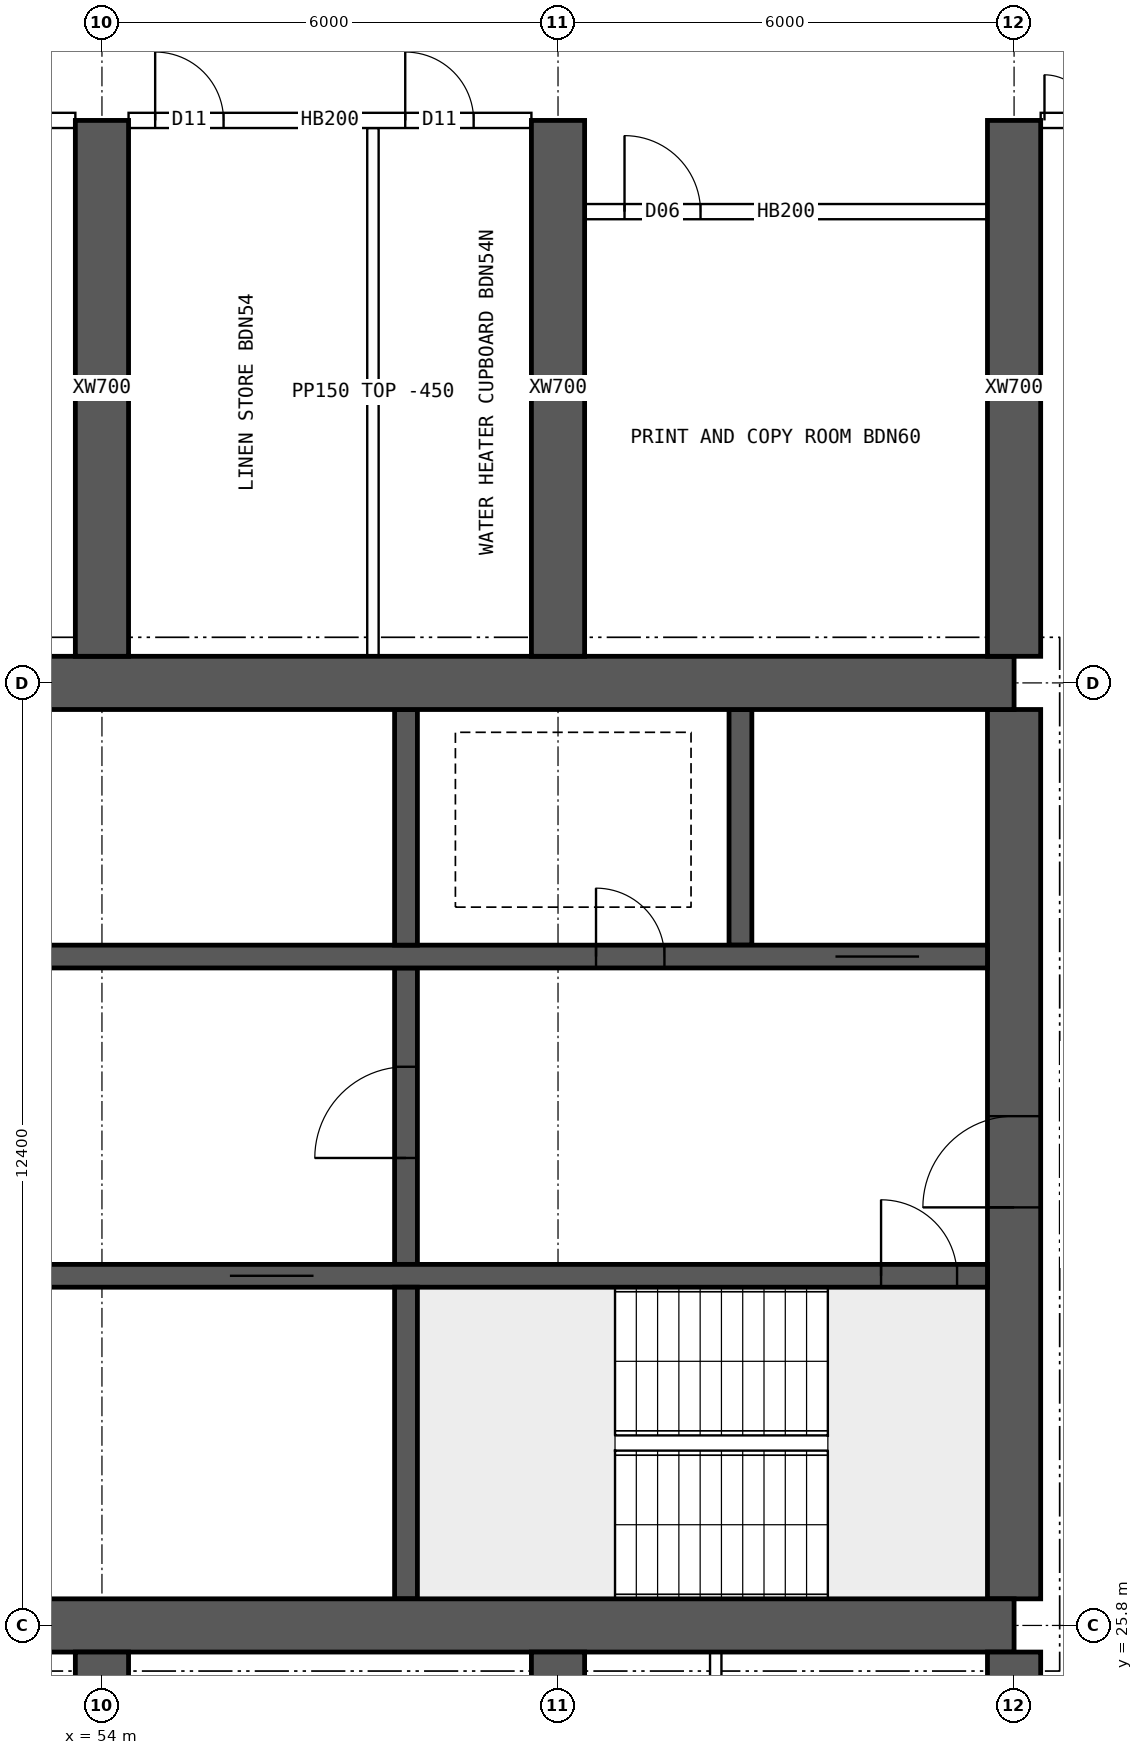
"""IFC4 building model, lengths in metres.
Left out: names, types, materials, properties, quantities, classifications, styles, units other than length and angle.
Written with IfcOpenShell. Run it as: python <this file> out.ifc"""

import sys

from ifc_helpers import new_model, si_unit, direction, frame, frame_2d, origin, place, context, subcontext, project, spatial, rectangle, extrude, element, fill, save


model = new_model("IFC4")
c1 = context("Model", 3, precision=1e-05, world=origin(), true_north=direction((0.0, 1.0)))
c2 = subcontext(c1, "Body", "Model", "MODEL_VIEW")
j1 = project(units=[si_unit("LENGTHUNIT", "METRE"), si_unit("PLANEANGLEUNIT", "RADIAN")], contexts=[c1])
p1 = place(None, origin())
s1 = spatial("IfcSite", under=j1, at=p1, CompositionType="ELEMENT")
p2 = place(p1, origin())
s2 = spatial("IfcBuilding", under=s1, at=p2, CompositionType="ELEMENT")
p3 = place(p2, frame((0.0, 0.0, 227.8)))
s3 = spatial("IfcBuildingStorey", under=s2, at=p3, CompositionType="ELEMENT", Elevation=227.8)
for number, where, z_axis, x_axis in (
    (1, (18.0, 25.8, 0.0), (0.0, 0.0, 1.0), (1.0, 0.0, 0.0)),
    (2, (18.0, 38.2, 0.0), (0.0, 0.0, 1.0), (1.0, 0.0, 0.0)),
):
    element("IfcWall", number, at=place(p3, frame(where, z_axis=z_axis, x_axis=x_axis)), inside=s3, PredefinedType="SHEAR", context=c2, shape_type="SweptSolid", body=[
        extrude(rectangle(XDim=48.0, YDim=0.7, at=frame_2d((24.0, 0.0))), origin(), (0.0, 0.0, 1.0), 3.75),
    ])
p4 = place(p3, frame((66.0, 26.15, 0.0), z_axis=(0.0, 0.0, 1.0), x_axis=(0.0, 1.0, 0.0)))
e3 = element("IfcWall", 3, at=p4, inside=s3, PredefinedType="SHEAR", context=c2, shape_type="SweptSolid", body=[
    extrude(rectangle(XDim=11.7, YDim=0.7, at=frame_2d((5.85, 0.0))), origin(), (0.0, 0.0, 1.0), 3.75),
])
p5 = place(p4, frame((5.15, 0.0, 0.0)))
e4 = element("IfcOpeningElement", 4, at=p5, cuts=e3, PredefinedType="OPENING", context=c2, shape_type="SweptSolid", body=[
    extrude(rectangle(XDim=1.2, YDim=2.1, at=frame_2d((0.6, 1.05))), frame((0.0, 0.36, 0.0), z_axis=(0.0, -1.0, 0.0), x_axis=(1.0, 0.0, 0.0)), (0.0, 0.0, 1.0), 0.72),
])
p6 = place(p3, frame((18.35, 30.4, 0.0), z_axis=(0.0, 0.0, 1.0), x_axis=(1.0, 0.0, 0.0)))
e5 = element("IfcWall", 5, at=p6, inside=s3, PredefinedType="SHEAR", context=c2, shape_type="SweptSolid", body=[
    extrude(rectangle(XDim=47.3, YDim=0.3, at=frame_2d((23.65, 0.0))), origin(), (0.0, 0.0, 1.0), 3.75),
])
p7 = place(p6, frame((0.4, 0.0, 0.0)))
e6 = element("IfcOpeningElement", 6, at=p7, cuts=e5, PredefinedType="OPENING", context=c2, shape_type="SweptSolid", body=[
    extrude(rectangle(XDim=1.0, YDim=2.1, at=frame_2d((0.5, 1.05))), frame((0.0, 0.16, 0.0), z_axis=(0.0, -1.0, 0.0), x_axis=(1.0, 0.0, 0.0)), (0.0, 0.0, 1.0), 0.32),
])
p8 = place(p6, frame((45.9, 0.0, 0.0)))
e7 = element("IfcOpeningElement", 7, at=p8, cuts=e5, PredefinedType="OPENING", context=c2, shape_type="SweptSolid", body=[
    extrude(rectangle(XDim=1.0, YDim=2.1, at=frame_2d((0.5, 1.05))), frame((0.0, 0.16, 0.0), z_axis=(0.0, -1.0, 0.0), x_axis=(1.0, 0.0, 0.0)), (0.0, 0.0, 1.0), 0.32),
])
p9 = place(p6, frame((8.4, 0.0, 0.0)))
e8 = element("IfcOpeningElement", 8, at=p9, cuts=e5, PredefinedType="OPENING", context=c2, shape_type="SweptSolid", body=[
    extrude(rectangle(XDim=1.1, YDim=2.1, at=frame_2d((0.55, 1.05))), frame((0.0, 0.16, 0.0), z_axis=(0.0, -1.0, 0.0), x_axis=(1.0, 0.0, 0.0)), (0.0, 0.0, 1.0), 0.32),
])
p10 = place(p6, frame((11.0, 0.0, 0.0)))
e9 = element("IfcOpeningElement", 9, at=p10, cuts=e5, PredefinedType="OPENING", context=c2, shape_type="SweptSolid", body=[
    extrude(rectangle(XDim=1.1, YDim=2.1, at=frame_2d((0.55, 1.05))), frame((0.0, 0.16, 0.0), z_axis=(0.0, -1.0, 0.0), x_axis=(1.0, 0.0, 0.0)), (0.0, 0.0, 1.0), 0.32),
])
p11 = place(p6, frame((13.6, 0.0, 0.0)))
e10 = element("IfcOpeningElement", 10, at=p11, cuts=e5, PredefinedType="OPENING", context=c2, shape_type="SweptSolid", body=[
    extrude(rectangle(XDim=1.1, YDim=2.1, at=frame_2d((0.55, 1.05))), frame((0.0, 0.16, 0.0), z_axis=(0.0, -1.0, 0.0), x_axis=(1.0, 0.0, 0.0)), (0.0, 0.0, 1.0), 0.32),
])
p12 = place(p6, frame((16.2, 0.0, 0.0)))
e11 = element("IfcOpeningElement", 11, at=p12, cuts=e5, PredefinedType="OPENING", context=c2, shape_type="SweptSolid", body=[
    extrude(rectangle(XDim=1.1, YDim=2.1, at=frame_2d((0.55, 1.05))), frame((0.0, 0.16, 0.0), z_axis=(0.0, -1.0, 0.0), x_axis=(1.0, 0.0, 0.0)), (0.0, 0.0, 1.0), 0.32),
])
p13 = place(p6, frame((18.975, 0.0, 0.0)))
e12 = element("IfcOpeningElement", 12, at=p13, cuts=e5, PredefinedType="OPENING", context=c2, shape_type="SweptSolid", body=[
    extrude(rectangle(XDim=0.9, YDim=2.1, at=frame_2d((0.45, 1.05))), frame((0.0, 0.16, 0.0), z_axis=(0.0, -1.0, 0.0), x_axis=(1.0, 0.0, 0.0)), (0.0, 0.0, 1.0), 0.32),
])
p14 = place(p6, frame((24.475, 0.0, 0.0)))
e13 = element("IfcOpeningElement", 13, at=p14, cuts=e5, PredefinedType="OPENING", context=c2, shape_type="SweptSolid", body=[
    extrude(rectangle(XDim=0.9, YDim=2.1, at=frame_2d((0.45, 1.05))), frame((0.0, 0.16, 0.0), z_axis=(0.0, -1.0, 0.0), x_axis=(1.0, 0.0, 0.0)), (0.0, 0.0, 1.0), 0.32),
])
p15 = place(p6, frame((30.267, 0.0, 0.0)))
e14 = element("IfcOpeningElement", 14, at=p15, cuts=e5, PredefinedType="OPENING", context=c2, shape_type="SweptSolid", body=[
    extrude(rectangle(XDim=1.1, YDim=2.1, at=frame_2d((0.55, 1.05))), frame((0.0, 0.16, 0.0), z_axis=(0.0, -1.0, 0.0), x_axis=(1.0, 0.0, 0.0)), (0.0, 0.0, 1.0), 0.32),
])
p16 = place(p6, frame((33.8, 0.0, 0.0)))
e15 = element("IfcOpeningElement", 15, at=p16, cuts=e5, PredefinedType="OPENING", context=c2, shape_type="SweptSolid", body=[
    extrude(rectangle(XDim=1.1, YDim=2.1, at=frame_2d((0.55, 1.05))), frame((0.0, 0.16, 0.0), z_axis=(0.0, -1.0, 0.0), x_axis=(1.0, 0.0, 0.0)), (0.0, 0.0, 1.0), 0.32),
])
p17 = place(p6, frame((37.333, 0.0, 0.0)))
e16 = element("IfcOpeningElement", 16, at=p17, cuts=e5, PredefinedType="OPENING", context=c2, shape_type="SweptSolid", body=[
    extrude(rectangle(XDim=1.1, YDim=2.1, at=frame_2d((0.55, 1.05))), frame((0.0, 0.16, 0.0), z_axis=(0.0, -1.0, 0.0), x_axis=(1.0, 0.0, 0.0)), (0.0, 0.0, 1.0), 0.32),
])
p18 = place(p3, frame((18.35, 34.6, 0.0), z_axis=(0.0, 0.0, 1.0), x_axis=(1.0, 0.0, 0.0)))
e17 = element("IfcWall", 17, at=p18, inside=s3, PredefinedType="SHEAR", context=c2, shape_type="SweptSolid", body=[
    extrude(rectangle(XDim=47.3, YDim=0.3, at=frame_2d((23.65, 0.0))), origin(), (0.0, 0.0, 1.0), 3.75),
])
p19 = place(p18, frame((0.9, 0.0, 0.0)))
e18 = element("IfcOpeningElement", 18, at=p19, cuts=e17, PredefinedType="OPENING", context=c2, shape_type="SweptSolid", body=[
    extrude(rectangle(XDim=1.1, YDim=2.1, at=frame_2d((0.55, 1.05))), frame((0.0, 0.16, 0.0), z_axis=(0.0, -1.0, 0.0), x_axis=(1.0, 0.0, 0.0)), (0.0, 0.0, 1.0), 0.32),
])
p20 = place(p18, frame((45.3, 0.0, 0.0)))
e19 = element("IfcOpeningElement", 19, at=p20, cuts=e17, PredefinedType="OPENING", context=c2, shape_type="SweptSolid", body=[
    extrude(rectangle(XDim=1.1, YDim=2.1, at=frame_2d((0.55, 1.05))), frame((0.0, 0.16, 0.0), z_axis=(0.0, -1.0, 0.0), x_axis=(1.0, 0.0, 0.0)), (0.0, 0.0, 1.0), 0.32),
])
p21 = place(p18, frame((4.25, 0.0, 0.0)))
e20 = element("IfcOpeningElement", 20, at=p21, cuts=e17, PredefinedType="OPENING", context=c2, shape_type="SweptSolid", body=[
    extrude(rectangle(XDim=0.9, YDim=2.1, at=frame_2d((0.45, 1.05))), frame((0.0, 0.16, 0.0), z_axis=(0.0, -1.0, 0.0), x_axis=(1.0, 0.0, 0.0)), (0.0, 0.0, 1.0), 0.32),
])
p22 = place(p18, frame((42.15, 0.0, 0.0)))
e21 = element("IfcOpeningElement", 21, at=p22, cuts=e17, PredefinedType="OPENING", context=c2, shape_type="SweptSolid", body=[
    extrude(rectangle(XDim=0.9, YDim=2.1, at=frame_2d((0.45, 1.05))), frame((0.0, 0.16, 0.0), z_axis=(0.0, -1.0, 0.0), x_axis=(1.0, 0.0, 0.0)), (0.0, 0.0, 1.0), 0.32),
])
p23 = place(p18, frame((9.025, 0.0, 0.0)))
e22 = element("IfcOpeningElement", 22, at=p23, cuts=e17, PredefinedType="OPENING", context=c2, shape_type="SweptSolid", body=[
    extrude(rectangle(XDim=0.9, YDim=2.1, at=frame_2d((0.45, 1.05))), frame((0.0, 0.16, 0.0), z_axis=(0.0, -1.0, 0.0), x_axis=(1.0, 0.0, 0.0)), (0.0, 0.0, 1.0), 0.32),
])
p24 = place(p18, frame((12.999, 0.0, 0.0)))
e23 = element("IfcOpeningElement", 23, at=p24, cuts=e17, PredefinedType="OPENING", context=c2, shape_type="SweptSolid", body=[
    extrude(rectangle(XDim=0.9, YDim=2.1, at=frame_2d((0.45, 1.05))), frame((0.0, 0.16, 0.0), z_axis=(0.0, -1.0, 0.0), x_axis=(1.0, 0.0, 0.0)), (0.0, 0.0, 1.0), 0.32),
])
p25 = place(p18, frame((16.646, 0.0, 0.0)))
e24 = element("IfcOpeningElement", 24, at=p25, cuts=e17, PredefinedType="OPENING", context=c2, shape_type="SweptSolid", body=[
    extrude(rectangle(XDim=0.9, YDim=2.1, at=frame_2d((0.45, 1.05))), frame((0.0, 0.16, 0.0), z_axis=(0.0, -1.0, 0.0), x_axis=(1.0, 0.0, 0.0)), (0.0, 0.0, 1.0), 0.32),
])
p26 = place(p18, frame((20.405, 0.0, 0.0)))
e25 = element("IfcOpeningElement", 25, at=p26, cuts=e17, PredefinedType="OPENING", context=c2, shape_type="SweptSolid", body=[
    extrude(rectangle(XDim=0.9, YDim=2.1, at=frame_2d((0.45, 1.05))), frame((0.0, 0.16, 0.0), z_axis=(0.0, -1.0, 0.0), x_axis=(1.0, 0.0, 0.0)), (0.0, 0.0, 1.0), 0.32),
])
p27 = place(p18, frame((24.811, 0.0, 0.0)))
e26 = element("IfcOpeningElement", 26, at=p27, cuts=e17, PredefinedType="OPENING", context=c2, shape_type="SweptSolid", body=[
    extrude(rectangle(XDim=0.9, YDim=2.1, at=frame_2d((0.45, 1.05))), frame((0.0, 0.16, 0.0), z_axis=(0.0, -1.0, 0.0), x_axis=(1.0, 0.0, 0.0)), (0.0, 0.0, 1.0), 0.32),
])
p28 = place(p18, frame((27.608, 0.0, 0.0)))
e27 = element("IfcOpeningElement", 27, at=p28, cuts=e17, PredefinedType="OPENING", context=c2, shape_type="SweptSolid", body=[
    extrude(rectangle(XDim=0.9, YDim=2.1, at=frame_2d((0.45, 1.05))), frame((0.0, 0.16, 0.0), z_axis=(0.0, -1.0, 0.0), x_axis=(1.0, 0.0, 0.0)), (0.0, 0.0, 1.0), 0.32),
])
p29 = place(p18, frame((33.729, 0.0, 0.0)))
e28 = element("IfcOpeningElement", 28, at=p29, cuts=e17, PredefinedType="OPENING", context=c2, shape_type="SweptSolid", body=[
    extrude(rectangle(XDim=0.9, YDim=2.1, at=frame_2d((0.45, 1.05))), frame((0.0, 0.16, 0.0), z_axis=(0.0, -1.0, 0.0), x_axis=(1.0, 0.0, 0.0)), (0.0, 0.0, 1.0), 0.32),
])
p30 = place(p3, frame((58.0, 26.15, 0.0), z_axis=(0.0, 0.0, 1.0), x_axis=(0.0, 1.0, 0.0)))
e29 = element("IfcWall", 29, at=p30, inside=s3, PredefinedType="SHEAR", context=c2, shape_type="SweptSolid", body=[
    extrude(rectangle(XDim=4.1, YDim=0.3, at=frame_2d((2.05, 0.0))), origin(), (0.0, 0.0, 1.0), 3.75),
])
p31 = place(p3, frame((58.0, 30.55, 0.0), z_axis=(0.0, 0.0, 1.0), x_axis=(0.0, 1.0, 0.0)))
e30 = element("IfcWall", 30, at=p31, inside=s3, PredefinedType="SHEAR", context=c2, shape_type="SweptSolid", body=[
    extrude(rectangle(XDim=3.9, YDim=0.3, at=frame_2d((1.95, 0.0))), origin(), (0.0, 0.0, 1.0), 3.75),
])
p32 = place(p31, frame((1.4, 0.0, 0.0)))
e31 = element("IfcOpeningElement", 31, at=p32, cuts=e30, PredefinedType="OPENING", context=c2, shape_type="SweptSolid", body=[
    extrude(rectangle(XDim=1.2, YDim=2.1, at=frame_2d((0.6, 1.05))), frame((0.0, 0.16, 0.0), z_axis=(0.0, -1.0, 0.0), x_axis=(1.0, 0.0, 0.0)), (0.0, 0.0, 1.0), 0.32),
])
for number, where, z_axis, x_axis in (
    (32, (62.4, 34.75, 0.0), (0.0, 0.0, 1.0), (0.0, 1.0, 0.0)),
    (33, (58.0, 34.75, 0.0), (0.0, 0.0, 1.0), (0.0, 1.0, 0.0)),
):
    element("IfcWall", number, at=place(p3, frame(where, z_axis=z_axis, x_axis=x_axis)), inside=s3, PredefinedType="SHEAR", context=c2, shape_type="SweptSolid", body=[
        extrude(rectangle(XDim=3.1, YDim=0.3, at=frame_2d((1.55, 0.0))), origin(), (0.0, 0.0, 1.0), 3.75),
    ])
for number, where, z_axis, x_axis in (
    (34, (54.0, 18.4, 0.0), (0.0, 0.0, 1.0), (0.0, 1.0, 0.0)),
    (35, (54.0, 38.55, 0.0), (0.0, 0.0, 1.0), (0.0, 1.0, 0.0)),
    (36, (60.0, 18.4, 0.0), (0.0, 0.0, 1.0), (0.0, 1.0, 0.0)),
    (37, (60.0, 38.55, 0.0), (0.0, 0.0, 1.0), (0.0, 1.0, 0.0)),
    (38, (66.0, 18.4, 0.0), (0.0, 0.0, 1.0), (0.0, 1.0, 0.0)),
    (39, (66.0, 38.55, 0.0), (0.0, 0.0, 1.0), (0.0, 1.0, 0.0)),
):
    element("IfcWall", number, at=place(p3, frame(where, z_axis=z_axis, x_axis=x_axis)), inside=s3, PredefinedType="SHEAR", context=c2, shape_type="SweptSolid", body=[
        extrude(rectangle(XDim=7.05, YDim=0.7, at=frame_2d((3.525, 0.0))), origin(), (0.0, 0.0, 1.0), 3.75),
    ])
p33 = place(p3, frame((48.35, 45.6, 0.0), z_axis=(0.0, 0.0, 1.0), x_axis=(1.0, 0.0, 0.0)))
e40 = element("IfcWall", 40, at=p33, inside=s3, PredefinedType="SOLIDWALL", context=c2, shape_type="SweptSolid", body=[
    extrude(rectangle(XDim=5.3, YDim=0.2, at=frame_2d((2.65, 0.0))), origin(), (0.0, 0.0, 1.0), 3.3),
])
p34 = place(p33, frame((0.525, 0.0, 0.0)))
e41 = element("IfcOpeningElement", 41, at=p34, cuts=e40, PredefinedType="OPENING", context=c2, shape_type="SweptSolid", body=[
    extrude(rectangle(XDim=1.0, YDim=2.1, at=frame_2d((0.5, 1.05))), frame((0.0, 0.11, 0.0), z_axis=(0.0, -1.0, 0.0), x_axis=(1.0, 0.0, 0.0)), (0.0, 0.0, 1.0), 0.22),
])
p35 = place(p3, frame((54.35, 45.6, 0.0), z_axis=(0.0, 0.0, 1.0), x_axis=(1.0, 0.0, 0.0)))
e42 = element("IfcWall", 42, at=p35, inside=s3, PredefinedType="SOLIDWALL", context=c2, shape_type="SweptSolid", body=[
    extrude(rectangle(XDim=5.3, YDim=0.2, at=frame_2d((2.65, 0.0))), origin(), (0.0, 0.0, 1.0), 3.3),
])
p36 = place(p35, frame((0.35, 0.0, 0.0)))
e43 = element("IfcOpeningElement", 43, at=p36, cuts=e42, PredefinedType="OPENING", context=c2, shape_type="SweptSolid", body=[
    extrude(rectangle(XDim=0.9, YDim=2.1, at=frame_2d((0.45, 1.05))), frame((0.0, 0.11, 0.0), z_axis=(0.0, -1.0, 0.0), x_axis=(1.0, 0.0, 0.0)), (0.0, 0.0, 1.0), 0.22),
])
p37 = place(p35, frame((3.64, 0.0, 0.0)))
e44 = element("IfcOpeningElement", 44, at=p37, cuts=e42, PredefinedType="OPENING", context=c2, shape_type="SweptSolid", body=[
    extrude(rectangle(XDim=0.9, YDim=2.1, at=frame_2d((0.45, 1.05))), frame((0.0, 0.11, 0.0), z_axis=(0.0, -1.0, 0.0), x_axis=(1.0, 0.0, 0.0)), (0.0, 0.0, 1.0), 0.22),
])
p38 = place(p3, frame((66.35, 45.6, 0.0), z_axis=(0.0, 0.0, 1.0), x_axis=(1.0, 0.0, 0.0)))
e45 = element("IfcWall", 45, at=p38, inside=s3, PredefinedType="SOLIDWALL", context=c2, shape_type="SweptSolid", body=[
    extrude(rectangle(XDim=2.05, YDim=0.2, at=frame_2d((1.025, 0.0))), origin(), (0.0, 0.0, 1.0), 3.3),
])
p39 = place(p38, frame((0.05, 0.0, 0.0)))
e46 = element("IfcOpeningElement", 46, at=p39, cuts=e45, PredefinedType="OPENING", context=c2, shape_type="SweptSolid", body=[
    extrude(rectangle(XDim=1.2, YDim=2.1, at=frame_2d((0.6, 1.05))), frame((0.0, 0.11, 0.0), z_axis=(0.0, -1.0, 0.0), x_axis=(1.0, 0.0, 0.0)), (0.0, 0.0, 1.0), 0.22),
])
for number, where, z_axis, x_axis in (
    (47, (62.075, 18.5, 0.0), (0.0, 0.0, 1.0), (0.0, 1.0, 0.0)),
    (48, (57.565, 38.55, 0.0), (0.0, 0.0, 1.0), (0.0, 1.0, 0.0)),
):
    element("IfcWall", number, at=place(p3, frame(where, z_axis=z_axis, x_axis=x_axis)), inside=s3, PredefinedType="PARTITIONING", context=c2, shape_type="SweptSolid", body=[
        extrude(rectangle(XDim=6.95, YDim=0.15, at=frame_2d((3.475, 0.0))), origin(), (0.0, 0.0, 1.0), 3.3),
    ])
p40 = place(p3, frame((60.35, 44.4, 0.0), z_axis=(0.0, 0.0, 1.0), x_axis=(1.0, 0.0, 0.0)))
e49 = element("IfcWall", 49, at=p40, inside=s3, PredefinedType="SOLIDWALL", context=c2, shape_type="SweptSolid", body=[
    extrude(rectangle(XDim=5.3, YDim=0.2, at=frame_2d((2.65, 0.0))), origin(), (0.0, 0.0, 1.0), 3.3),
])
p41 = place(p40, frame((0.525, 0.0, 0.0)))
e50 = element("IfcOpeningElement", 50, at=p41, cuts=e49, PredefinedType="OPENING", context=c2, shape_type="SweptSolid", body=[
    extrude(rectangle(XDim=1.0, YDim=2.1, at=frame_2d((0.5, 1.05))), frame((0.0, 0.11, 0.0), z_axis=(0.0, -1.0, 0.0), x_axis=(1.0, 0.0, 0.0)), (0.0, 0.0, 1.0), 0.22),
])
p42 = place(p5, origin())
e51 = element("IfcDoor", 51, at=p42, inside=s3, OperationType="SINGLE_SWING_LEFT", PredefinedType="DOOR", context=c2, shape_type="SweptSolid", body=[
    extrude(rectangle(XDim=1.2, YDim=2.1, at=frame_2d((0.6, 1.05))), frame((0.0, 0.025, 0.0), z_axis=(0.0, -1.0, 0.0), x_axis=(1.0, 0.0, 0.0)), (0.0, 0.0, 1.0), 0.05),
])
fill(e4, e51)
p43 = place(p8, origin())
e52 = element("IfcDoor", 52, at=p43, inside=s3, OperationType="SINGLE_SWING_LEFT", PredefinedType="DOOR", context=c2, shape_type="SweptSolid", body=[
    extrude(rectangle(XDim=1.0, YDim=2.1, at=frame_2d((0.5, 1.05))), frame((0.0, 0.025, 0.0), z_axis=(0.0, -1.0, 0.0), x_axis=(1.0, 0.0, 0.0)), (0.0, 0.0, 1.0), 0.05),
])
fill(e7, e52)
p44 = place(p20, origin())
e53 = element("IfcDoor", 53, at=p44, inside=s3, OperationType="DOUBLE_DOOR_SLIDING", PredefinedType="DOOR", context=c2, shape_type="SweptSolid", body=[
    extrude(rectangle(XDim=1.1, YDim=2.1, at=frame_2d((0.55, 1.05))), frame((0.0, 0.025, 0.0), z_axis=(0.0, -1.0, 0.0), x_axis=(1.0, 0.0, 0.0)), (0.0, 0.0, 1.0), 0.05),
])
fill(e19, e53)
p45 = place(p22, origin())
e54 = element("IfcDoor", 54, at=p45, inside=s3, OperationType="SINGLE_SWING_LEFT", PredefinedType="DOOR", context=c2, shape_type="SweptSolid", body=[
    extrude(rectangle(XDim=0.9, YDim=2.1, at=frame_2d((0.45, 1.05))), frame((0.0, 0.025, 0.0), z_axis=(0.0, -1.0, 0.0), x_axis=(1.0, 0.0, 0.0)), (0.0, 0.0, 1.0), 0.05),
])
fill(e21, e54)
p46 = place(p32, origin())
e55 = element("IfcDoor", 55, at=p46, inside=s3, OperationType="SINGLE_SWING_LEFT", PredefinedType="DOOR", context=c2, shape_type="SweptSolid", body=[
    extrude(rectangle(XDim=1.2, YDim=2.1, at=frame_2d((0.6, 1.05))), frame((0.0, 0.025, 0.0), z_axis=(0.0, -1.0, 0.0), x_axis=(1.0, 0.0, 0.0)), (0.0, 0.0, 1.0), 0.05),
])
fill(e31, e55)
p47 = place(p17, origin())
e56 = element("IfcDoor", 56, at=p47, inside=s3, OperationType="DOUBLE_DOOR_SLIDING", PredefinedType="DOOR", context=c2, shape_type="SweptSolid", body=[
    extrude(rectangle(XDim=1.1, YDim=2.1, at=frame_2d((0.55, 1.05))), frame((0.0, 0.025, 0.0), z_axis=(0.0, -1.0, 0.0), x_axis=(1.0, 0.0, 0.0)), (0.0, 0.0, 1.0), 0.05),
])
fill(e16, e56)
p48 = place(p39, origin())
e57 = element("IfcDoor", 57, at=p48, inside=s3, OperationType="DOUBLE_DOOR_SINGLE_SWING", PredefinedType="DOOR", context=c2, shape_type="SweptSolid", body=[
    extrude(rectangle(XDim=1.2, YDim=2.1, at=frame_2d((0.6, 1.05))), frame((0.0, 0.025, 0.0), z_axis=(0.0, -1.0, 0.0), x_axis=(1.0, 0.0, 0.0)), (0.0, 0.0, 1.0), 0.05),
])
fill(e46, e57)
p49 = place(p36, origin())
e58 = element("IfcDoor", 58, at=p49, inside=s3, OperationType="SINGLE_SWING_LEFT", PredefinedType="DOOR", context=c2, shape_type="SweptSolid", body=[
    extrude(rectangle(XDim=0.9, YDim=2.1, at=frame_2d((0.45, 1.05))), frame((0.0, 0.025, 0.0), z_axis=(0.0, -1.0, 0.0), x_axis=(1.0, 0.0, 0.0)), (0.0, 0.0, 1.0), 0.05),
])
fill(e43, e58)
p50 = place(p37, origin())
e59 = element("IfcDoor", 59, at=p50, inside=s3, OperationType="SINGLE_SWING_LEFT", PredefinedType="DOOR", context=c2, shape_type="SweptSolid", body=[
    extrude(rectangle(XDim=0.9, YDim=2.1, at=frame_2d((0.45, 1.05))), frame((0.0, 0.025, 0.0), z_axis=(0.0, -1.0, 0.0), x_axis=(1.0, 0.0, 0.0)), (0.0, 0.0, 1.0), 0.05),
])
fill(e44, e59)
p51 = place(p41, origin())
e60 = element("IfcDoor", 60, at=p51, inside=s3, OperationType="SINGLE_SWING_LEFT", PredefinedType="DOOR", context=c2, shape_type="SweptSolid", body=[
    extrude(rectangle(XDim=1.0, YDim=2.1, at=frame_2d((0.5, 1.05))), frame((0.0, 0.025, 0.0), z_axis=(0.0, -1.0, 0.0), x_axis=(1.0, 0.0, 0.0)), (0.0, 0.0, 1.0), 0.05),
])
fill(e50, e60)
save(model, sys.argv[1])
